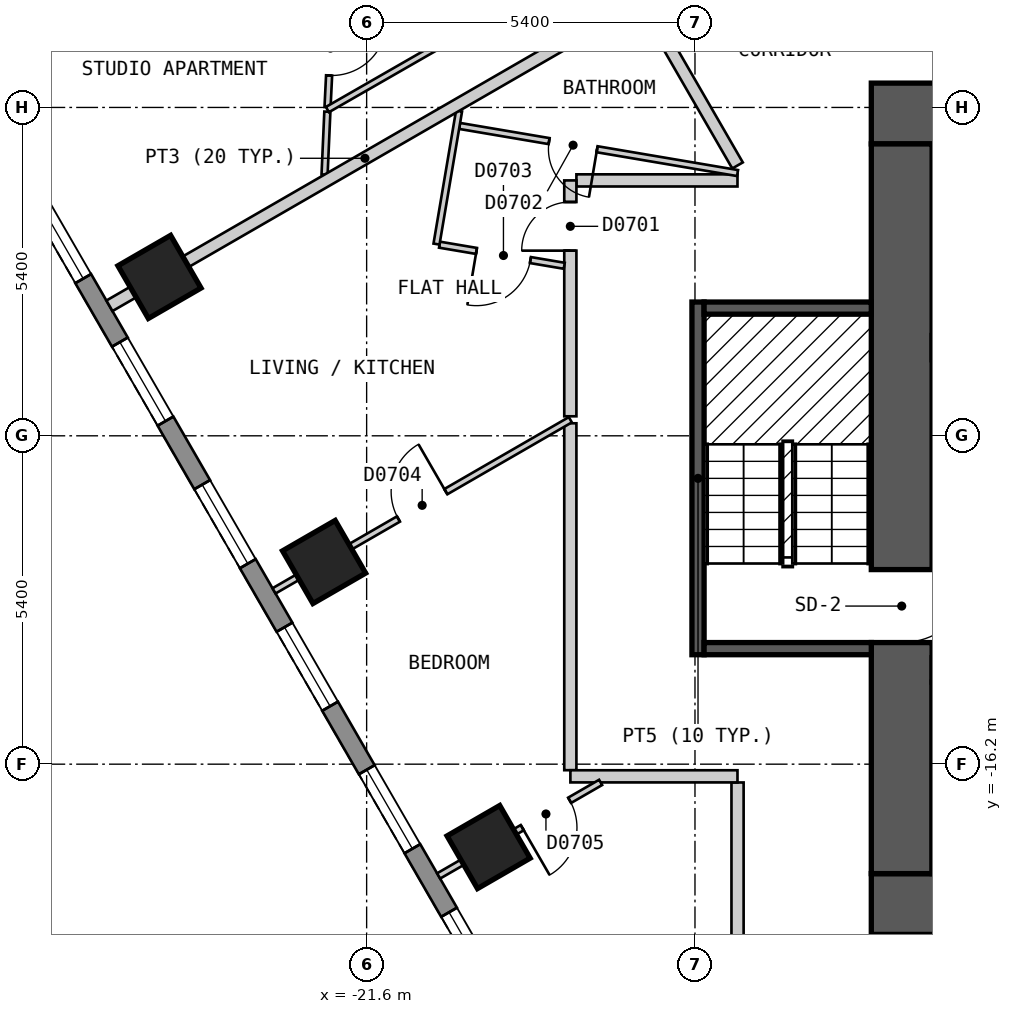
"""IFC4 building model, lengths in metres.
Left out: names, types, materials, properties, quantities, classifications, styles, units other than length and angle.
Written with IfcOpenShell. Run it as: python <this file> out.ifc"""

import sys

from ifc_helpers import new_model, si_unit, direction, frame, frame_2d, origin, origin_2d, place, context, subcontext, project, spatial, polyline, rectangle, outline, extrude, element, fill, save


model = new_model("IFC4")
c1 = context("Model", 3, precision=1e-05, world=origin(), true_north=direction((0.0, 1.0)))
c2 = subcontext(c1, "Body", "Model", "MODEL_VIEW")
j1 = project(units=[si_unit("LENGTHUNIT", "METRE"), si_unit("PLANEANGLEUNIT", "RADIAN")], contexts=[c1])
p1 = place(None, origin())
s1 = spatial("IfcSite", under=j1, at=p1, CompositionType="ELEMENT")
p2 = place(p1, origin())
s2 = spatial("IfcBuilding", under=s1, at=p2, CompositionType="ELEMENT")
p3 = place(p2, frame((0.0, 0.0, 99.0)))
s3 = spatial("IfcBuildingStorey", under=s2, at=p3, CompositionType="ELEMENT", Elevation=99.0)
for number, where, z_axis, x_axis in (
    (1, (-25.007, -8.187, 0.0), (0.0, 0.0, 1.0), (0.5, -0.866, 0.0)),
    (2, (-22.3, -12.875, 0.0), (0.0, 0.0, 1.0), (0.5, -0.866, 0.0)),
    (3, (-19.594, -17.563, 0.0), (0.0, 0.0, 1.0), (0.5, -0.866, 0.0)),
):
    element("IfcColumn", number, at=place(p3, frame(where, z_axis=z_axis, x_axis=x_axis)), inside=s3, PredefinedType="COLUMN", context=c2, shape_type="SweptSolid", body=[
        extrude(rectangle(XDim=1.0, YDim=1.0, at=origin_2d()), origin(), (0.0, 0.0, 1.0), 3.0),
    ])
p4 = place(p3, frame((-13.3, -18.5, 0.0), z_axis=(0.0, 0.0, 1.0), x_axis=(1.0, 0.0, 0.0)))
e4 = element("IfcWall", 4, at=p4, inside=s3, PredefinedType="SHEAR", context=c2, shape_type="SweptSolid", body=[
    extrude(rectangle(XDim=26.6, YDim=1.0, at=frame_2d((13.3, 0.0))), origin(), (0.0, 0.0, 1.0), 2.7),
])
p5 = place(p3, frame((-13.3, -5.5, 0.0), z_axis=(0.0, 0.0, 1.0), x_axis=(1.0, 0.0, 0.0)))
e5 = element("IfcWall", 5, at=p5, inside=s3, PredefinedType="SHEAR", context=c2, shape_type="SweptSolid", body=[
    extrude(rectangle(XDim=26.6, YDim=1.0, at=frame_2d((13.3, 0.0))), origin(), (0.0, 0.0, 1.0), 2.7),
])
p6 = place(p5, frame((23.65, 0.0, 0.0)))
e6 = element("IfcOpeningElement", 6, at=p6, cuts=e5, PredefinedType="OPENING", context=c2, shape_type="SweptSolid", body=[
    extrude(rectangle(XDim=1.2, YDim=2.1, at=frame_2d((0.6, 1.05))), frame((0.0, 0.51, 0.0), z_axis=(0.0, -1.0, 0.0), x_axis=(1.0, 0.0, 0.0)), (0.0, 0.0, 1.0), 1.02),
])
p7 = place(p3, frame((-12.8, -18.0, 0.0), z_axis=(0.0, 0.0, 1.0), x_axis=(0.0, 1.0, 0.0)))
e7 = element("IfcWall", 7, at=p7, inside=s3, PredefinedType="SHEAR", context=c2, shape_type="SweptSolid", body=[
    extrude(rectangle(XDim=12.0, YDim=1.0, at=frame_2d((6.0, 0.0))), origin(), (0.0, 0.0, 1.0), 2.7),
])
p8 = place(p7, frame((3.8, 0.0, 0.0)))
e8 = element("IfcOpeningElement", 8, at=p8, cuts=e7, PredefinedType="OPENING", context=c2, shape_type="SweptSolid", body=[
    extrude(rectangle(XDim=1.2, YDim=2.1, at=frame_2d((0.6, 1.05))), frame((0.0, 0.51, 0.0), z_axis=(0.0, -1.0, 0.0), x_axis=(1.0, 0.0, 0.0)), (0.0, 0.0, 1.0), 1.02),
])
p9 = place(p3, frame((-29.027, -3.425, 0.0), z_axis=(0.0, 0.0, 1.0), x_axis=(0.500035407905, -0.866004960056, 0.0)))
e9 = element("IfcWall", 9, at=p9, inside=s3, PredefinedType="SOLIDWALL", context=c2, shape_type="SweptSolid", body=[
    extrude(outline(polyline([(0.0, -0.15), (23.094, -0.15), (23.014, 0.15), (0.08, 0.15), (0.0, -0.15)])), origin(), (0.0, 0.0, 1.0), 2.7),
])
p10 = place(p9, frame((1.324, 0.0, 0.15)))
e10 = element("IfcOpeningElement", 10, at=p10, cuts=e9, PredefinedType="OPENING", context=c2, shape_type="SweptSolid", body=[
    extrude(rectangle(XDim=1.5, YDim=2.1, at=frame_2d((0.75, 1.05))), frame((0.0, 0.16, 0.0), z_axis=(0.0, -1.0, 0.0), x_axis=(1.0, 0.0, 0.0)), (0.0, 0.0, 1.0), 0.32),
])
p11 = place(p9, frame((4.031, 0.0, 0.15)))
e11 = element("IfcOpeningElement", 11, at=p11, cuts=e9, PredefinedType="OPENING", context=c2, shape_type="SweptSolid", body=[
    extrude(rectangle(XDim=1.5, YDim=2.1, at=frame_2d((0.75, 1.05))), frame((0.0, 0.16, 0.0), z_axis=(0.0, -1.0, 0.0), x_axis=(1.0, 0.0, 0.0)), (0.0, 0.0, 1.0), 0.32),
])
p12 = place(p9, frame((6.737, 0.0, 0.15)))
e12 = element("IfcOpeningElement", 12, at=p12, cuts=e9, PredefinedType="OPENING", context=c2, shape_type="SweptSolid", body=[
    extrude(rectangle(XDim=1.5, YDim=2.1, at=frame_2d((0.75, 1.05))), frame((0.0, 0.16, 0.0), z_axis=(0.0, -1.0, 0.0), x_axis=(1.0, 0.0, 0.0)), (0.0, 0.0, 1.0), 0.32),
])
p13 = place(p9, frame((9.444, 0.0, 0.15)))
e13 = element("IfcOpeningElement", 13, at=p13, cuts=e9, PredefinedType="OPENING", context=c2, shape_type="SweptSolid", body=[
    extrude(rectangle(XDim=1.5, YDim=2.1, at=frame_2d((0.75, 1.05))), frame((0.0, 0.16, 0.0), z_axis=(0.0, -1.0, 0.0), x_axis=(1.0, 0.0, 0.0)), (0.0, 0.0, 1.0), 0.32),
])
p14 = place(p9, frame((12.151, 0.0, 0.15)))
e14 = element("IfcOpeningElement", 14, at=p14, cuts=e9, PredefinedType="OPENING", context=c2, shape_type="SweptSolid", body=[
    extrude(rectangle(XDim=1.5, YDim=2.1, at=frame_2d((0.75, 1.05))), frame((0.0, 0.16, 0.0), z_axis=(0.0, -1.0, 0.0), x_axis=(1.0, 0.0, 0.0)), (0.0, 0.0, 1.0), 0.32),
])
p15 = place(p9, frame((14.857, 0.0, 0.15)))
e15 = element("IfcOpeningElement", 15, at=p15, cuts=e9, PredefinedType="OPENING", context=c2, shape_type="SweptSolid", body=[
    extrude(rectangle(XDim=1.5, YDim=2.1, at=frame_2d((0.75, 1.05))), frame((0.0, 0.16, 0.0), z_axis=(0.0, -1.0, 0.0), x_axis=(1.0, 0.0, 0.0)), (0.0, 0.0, 1.0), 0.32),
])
p16 = place(p9, frame((17.564, 0.0, 0.15)))
e16 = element("IfcOpeningElement", 16, at=p16, cuts=e9, PredefinedType="OPENING", context=c2, shape_type="SweptSolid", body=[
    extrude(rectangle(XDim=1.5, YDim=2.1, at=frame_2d((0.75, 1.05))), frame((0.0, 0.16, 0.0), z_axis=(0.0, -1.0, 0.0), x_axis=(1.0, 0.0, 0.0)), (0.0, 0.0, 1.0), 0.32),
])
p17 = place(p9, frame((20.27, 0.0, 0.15)))
e17 = element("IfcOpeningElement", 17, at=p17, cuts=e9, PredefinedType="OPENING", context=c2, shape_type="SweptSolid", body=[
    extrude(rectangle(XDim=1.5, YDim=2.1, at=frame_2d((0.75, 1.05))), frame((0.0, 0.16, 0.0), z_axis=(0.0, -1.0, 0.0), x_axis=(1.0, 0.0, 0.0)), (0.0, 0.0, 1.0), 0.32),
])
p18 = place(p3, frame((-16.855, -4.008, 0.0), z_axis=(0.0, 0.0, 1.0), x_axis=(0.500151474942, -0.865937932021, 0.0)))
e18 = element("IfcWall", 18, at=p18, inside=s3, PredefinedType="PARTITIONING", context=c2, shape_type="SweptSolid", body=[
    extrude(rectangle(XDim=2.709, YDim=0.2, at=frame_2d((1.354, 0.0))), origin(), (0.0, 0.0, 1.0), 2.7),
])
p19 = place(p3, frame((-15.5, -16.501, 0.0), z_axis=(0.0, 0.0, 1.0), x_axis=(0.0, -1.0, 0.0)))
e19 = element("IfcWall", 19, at=p19, inside=s3, PredefinedType="PARTITIONING", context=c2, shape_type="SweptSolid", body=[
    extrude(rectangle(XDim=4.598, YDim=0.2, at=frame_2d((2.299, 0.0))), origin(), (0.0, 0.0, 1.0), 2.7),
])
p20 = place(p3, frame((-18.25, -10.594, 0.0), z_axis=(0.0, 0.0, 1.0), x_axis=(0.0, -1.0, 0.0)))
e20 = element("IfcWall", 20, at=p20, inside=s3, PredefinedType="PARTITIONING", context=c2, shape_type="SweptSolid", body=[
    extrude(rectangle(XDim=5.705, YDim=0.2, at=frame_2d((2.853, 0.0))), origin(), (0.0, 0.0, 1.0), 2.7),
])
p21 = place(p3, frame((-18.15, -6.6, 0.0), z_axis=(0.0, 0.0, 1.0), x_axis=(1.0, 0.0, 0.0)))
e21 = element("IfcWall", 21, at=p21, inside=s3, PredefinedType="PARTITIONING", context=c2, shape_type="SweptSolid", body=[
    extrude(rectangle(XDim=2.649, YDim=0.2, at=frame_2d((1.324, 0.0))), origin(), (0.0, 0.0, 1.0), 2.7),
])
p22 = place(p3, frame((-18.249, -16.4, 0.0), z_axis=(0.0, 0.0, 1.0), x_axis=(1.0, 0.0, 0.0)))
e22 = element("IfcWall", 22, at=p22, inside=s3, PredefinedType="PARTITIONING", context=c2, shape_type="SweptSolid", body=[
    extrude(rectangle(XDim=2.748, YDim=0.2, at=frame_2d((1.374, 0.0))), origin(), (0.0, 0.0, 1.0), 2.7),
])
p23 = place(p3, frame((-18.25, -10.479, 0.0), z_axis=(0.0, 0.0, 1.0), x_axis=(0.0, 1.0, 0.0)))
e23 = element("IfcWall", 23, at=p23, inside=s3, PredefinedType="PARTITIONING", context=c2, shape_type="SweptSolid", body=[
    extrude(rectangle(XDim=3.879, YDim=0.2, at=frame_2d((1.939, 0.0))), origin(), (0.0, 0.0, 1.0), 2.7),
])
p24 = place(p23, frame((2.724, 0.0, 0.0)))
e24 = element("IfcOpeningElement", 24, at=p24, cuts=e23, PredefinedType="OPENING", context=c2, shape_type="SweptSolid", body=[
    extrude(rectangle(XDim=0.8, YDim=2.1, at=frame_2d((0.4, 1.05))), frame((0.0, 0.11, 0.0), z_axis=(0.0, -1.0, 0.0), x_axis=(1.0, 0.0, 0.0)), (0.0, 0.0, 1.0), 0.22),
])
p25 = place(p3, frame((-20.071, -5.704, 0.0), z_axis=(0.0, 0.0, 1.0), x_axis=(0.985933263306, -0.16713946364, 0.0)))
e25 = element("IfcWall", 25, at=p25, inside=s3, PredefinedType="PARTITIONING", context=c2, shape_type="SweptSolid", body=[
    extrude(rectangle(XDim=4.636, YDim=0.1, at=frame_2d((2.318, 0.0))), origin(), (0.0, 0.0, 1.0), 2.7),
])
p26 = place(p25, frame((1.493, 0.0, 0.0)))
e26 = element("IfcOpeningElement", 26, at=p26, cuts=e25, PredefinedType="OPENING", context=c2, shape_type="SweptSolid", body=[
    extrude(rectangle(XDim=0.8, YDim=2.1, at=frame_2d((0.4, 1.05))), frame((0.0, 0.06, 0.0), z_axis=(0.0, -1.0, 0.0), x_axis=(1.0, 0.0, 0.0)), (0.0, 0.0, 1.0), 0.12),
])
p27 = place(p3, frame((-20.401, -7.657, 0.0), z_axis=(0.0, 0.0, 1.0), x_axis=(0.985991281902, -0.166796858522, 0.0)))
e27 = element("IfcWall", 27, at=p27, inside=s3, PredefinedType="PARTITIONING", context=c2, shape_type="SweptSolid", body=[
    extrude(rectangle(XDim=2.08, YDim=0.1, at=frame_2d((1.04, 0.0))), origin(), (0.0, 0.0, 1.0), 2.7),
])
p28 = place(p27, frame((0.616, 0.0, 0.0)))
e28 = element("IfcOpeningElement", 28, at=p28, cuts=e27, PredefinedType="OPENING", context=c2, shape_type="SweptSolid", body=[
    extrude(rectangle(XDim=0.9, YDim=2.1, at=frame_2d((0.45, 1.05))), frame((0.0, 0.06, 0.0), z_axis=(0.0, -1.0, 0.0), x_axis=(1.0, 0.0, 0.0)), (0.0, 0.0, 1.0), 0.12),
])
p29 = place(p3, frame((-20.451, -7.647, 0.0), z_axis=(0.0, 0.0, 1.0), x_axis=(0.167037570483, 0.985950531237, 0.0)))
e29 = element("IfcWall", 29, at=p29, inside=s3, PredefinedType="PARTITIONING", context=c2, shape_type="SweptSolid", body=[
    extrude(rectangle(XDim=2.22, YDim=0.1, at=frame_2d((1.11, 0.0))), origin(), (0.0, 0.0, 1.0), 2.7),
])
p30 = place(p3, frame((-22.243, -5.395, 0.0), z_axis=(0.0, 0.0, 1.0), x_axis=(0.049092933256, 0.998794214993, 0.0)))
e30 = element("IfcWall", 30, at=p30, inside=s3, PredefinedType="PARTITIONING", context=c2, shape_type="SweptSolid", body=[
    extrude(rectangle(XDim=2.422, YDim=0.1, at=frame_2d((1.211, 0.0))), origin(), (0.0, 0.0, 1.0), 2.7),
])
p31 = place(p30, frame((0.522, 0.0, 0.0)))
e31 = element("IfcOpeningElement", 31, at=p31, cuts=e30, PredefinedType="OPENING", context=c2, shape_type="SweptSolid", body=[
    extrude(rectangle(XDim=0.9, YDim=2.1, at=frame_2d((0.45, 1.05))), frame((0.0, 0.06, 0.0), z_axis=(0.0, -1.0, 0.0), x_axis=(1.0, 0.0, 0.0)), (0.0, 0.0, 1.0), 0.12),
])
p32 = place(p3, frame((-22.292, -6.504, 0.0), z_axis=(0.0, 0.0, 1.0), x_axis=(0.04434829575, 0.999016130332, 0.0)))
e32 = element("IfcWall", 32, at=p32, inside=s3, PredefinedType="PARTITIONING", context=c2, shape_type="SweptSolid", body=[
    extrude(rectangle(XDim=1.035, YDim=0.1, at=frame_2d((0.518, 0.0))), origin(), (0.0, 0.0, 1.0), 2.7),
])
p33 = place(p3, frame((-20.416, -18.038, 0.0), z_axis=(0.0, 0.0, 1.0), x_axis=(0.866026989333, 0.499997253739, 0.0)))
e33 = element("IfcWall", 33, at=p33, inside=s3, PredefinedType="PARTITIONING", context=c2, shape_type="SweptSolid", body=[
    extrude(rectangle(XDim=3.076, YDim=0.1, at=frame_2d((1.538, 0.0))), origin(), (0.0, 0.0, 1.0), 2.7),
])
p34 = place(p33, frame((1.588, 0.0, 0.0)))
e34 = element("IfcOpeningElement", 34, at=p34, cuts=e33, PredefinedType="OPENING", context=c2, shape_type="SweptSolid", body=[
    extrude(rectangle(XDim=0.9, YDim=2.1, at=frame_2d((0.45, 1.05))), frame((0.0, 0.06, 0.0), z_axis=(0.0, -1.0, 0.0), x_axis=(1.0, 0.0, 0.0)), (0.0, 0.0, 1.0), 0.12),
])
p35 = place(p3, frame((-23.123, -13.35, 0.0), z_axis=(0.0, 0.0, 1.0), x_axis=(0.86596737403, 0.500100497016, 0.0)))
e35 = element("IfcWall", 35, at=p35, inside=s3, PredefinedType="PARTITIONING", context=c2, shape_type="SweptSolid", body=[
    extrude(rectangle(XDim=5.627, YDim=0.1, at=frame_2d((2.813, 0.0))), origin(), (0.0, 0.0, 1.0), 2.7),
])
p36 = place(p35, frame((2.363, 0.0, 0.0)))
e36 = element("IfcOpeningElement", 36, at=p36, cuts=e35, PredefinedType="OPENING", context=c2, shape_type="SweptSolid", body=[
    extrude(rectangle(XDim=0.9, YDim=2.1, at=frame_2d((0.45, 1.05))), frame((0.0, 0.06, 0.0), z_axis=(0.0, -1.0, 0.0), x_axis=(1.0, 0.0, 0.0)), (0.0, 0.0, 1.0), 0.12),
])
p37 = place(p3, frame((-22.245, -5.435, 0.0), z_axis=(0.0, 0.0, 1.0), x_axis=(0.867311485465, 0.497765795511, 0.0)))
e37 = element("IfcWall", 37, at=p37, inside=s3, PredefinedType="PARTITIONING", context=c2, shape_type="SweptSolid", body=[
    extrude(rectangle(XDim=5.282, YDim=0.1, at=frame_2d((2.641, 0.0))), origin(), (0.0, 0.0, 1.0), 2.7),
])
p38 = place(p37, frame((2.291, 0.0, 0.0)))
e38 = element("IfcOpeningElement", 38, at=p38, cuts=e37, PredefinedType="OPENING", context=c2, shape_type="SweptSolid", body=[
    extrude(rectangle(XDim=0.8, YDim=2.1, at=frame_2d((0.4, 1.05))), frame((0.0, 0.06, 0.0), z_axis=(0.0, -1.0, 0.0), x_axis=(1.0, 0.0, 0.0)), (0.0, 0.0, 1.0), 0.12),
])
p39 = place(p3, frame((-25.83, -8.662, 0.0), z_axis=(0.0, 0.0, 1.0), x_axis=(0.866026801646, 0.499997578825, 0.0)))
e39 = element("IfcWall", 39, at=p39, inside=s3, PredefinedType="PARTITIONING", context=c2, shape_type="SweptSolid", body=[
    extrude(rectangle(XDim=9.704, YDim=0.2, at=frame_2d((4.852, 0.0))), origin(), (0.0, 0.0, 1.0), 2.7),
])
p40 = place(p3, frame((-16.15, -14.4, 0.0), z_axis=(0.0, 0.0, 1.0), x_axis=(0.0, 1.0, 0.0)))
e40 = element("IfcWall", 40, at=p40, inside=s3, PredefinedType="SOLIDWALL", context=c2, shape_type="SweptSolid", body=[
    extrude(rectangle(XDim=5.8, YDim=0.2, at=frame_2d((2.9, 0.0))), origin(), (0.0, 0.0, 1.0), 2.7),
])
for number, where, z_axis, x_axis in (
    (41, (-16.05, -14.3, 0.0), (0.0, 0.0, 1.0), (1.0, 0.0, 0.0)),
    (42, (-16.05, -8.7, 0.0), (0.0, 0.0, 1.0), (1.0, 0.0, 0.0)),
):
    element("IfcWall", number, at=place(p3, frame(where, z_axis=z_axis, x_axis=x_axis)), inside=s3, PredefinedType="SOLIDWALL", context=c2, shape_type="SweptSolid", body=[
        extrude(rectangle(XDim=2.75, YDim=0.2, at=frame_2d((1.375, 0.0))), origin(), (0.0, 0.0, 1.0), 2.7),
    ])
p41 = place(p11, origin())
e43 = element("IfcWindow", 43, at=p41, inside=s3, PartitioningType="SINGLE_PANEL", PredefinedType="WINDOW", context=c2, shape_type="SweptSolid", body=[
    extrude(rectangle(XDim=1.5, YDim=2.1, at=frame_2d((0.75, 1.05))), frame((0.0, 0.03, 0.0), z_axis=(0.0, -1.0, 0.0), x_axis=(1.0, 0.0, 0.0)), (0.0, 0.0, 1.0), 0.06),
])
fill(e11, e43)
p42 = place(p12, origin())
e44 = element("IfcWindow", 44, at=p42, inside=s3, PartitioningType="SINGLE_PANEL", PredefinedType="WINDOW", context=c2, shape_type="SweptSolid", body=[
    extrude(rectangle(XDim=1.5, YDim=2.1, at=frame_2d((0.75, 1.05))), frame((0.0, 0.03, 0.0), z_axis=(0.0, -1.0, 0.0), x_axis=(1.0, 0.0, 0.0)), (0.0, 0.0, 1.0), 0.06),
])
fill(e12, e44)
p43 = place(p13, origin())
e45 = element("IfcWindow", 45, at=p43, inside=s3, PartitioningType="SINGLE_PANEL", PredefinedType="WINDOW", context=c2, shape_type="SweptSolid", body=[
    extrude(rectangle(XDim=1.5, YDim=2.1, at=frame_2d((0.75, 1.05))), frame((0.0, 0.03, 0.0), z_axis=(0.0, -1.0, 0.0), x_axis=(1.0, 0.0, 0.0)), (0.0, 0.0, 1.0), 0.06),
])
fill(e13, e45)
p44 = place(p14, origin())
e46 = element("IfcWindow", 46, at=p44, inside=s3, PartitioningType="SINGLE_PANEL", PredefinedType="WINDOW", context=c2, shape_type="SweptSolid", body=[
    extrude(rectangle(XDim=1.5, YDim=2.1, at=frame_2d((0.75, 1.05))), frame((0.0, 0.03, 0.0), z_axis=(0.0, -1.0, 0.0), x_axis=(1.0, 0.0, 0.0)), (0.0, 0.0, 1.0), 0.06),
])
fill(e14, e46)
p45 = place(p15, origin())
e47 = element("IfcWindow", 47, at=p45, inside=s3, PartitioningType="SINGLE_PANEL", PredefinedType="WINDOW", context=c2, shape_type="SweptSolid", body=[
    extrude(rectangle(XDim=1.5, YDim=2.1, at=frame_2d((0.75, 1.05))), frame((0.0, 0.03, 0.0), z_axis=(0.0, -1.0, 0.0), x_axis=(1.0, 0.0, 0.0)), (0.0, 0.0, 1.0), 0.06),
])
fill(e15, e47)
p46 = place(p16, origin())
e48 = element("IfcWindow", 48, at=p46, inside=s3, PartitioningType="SINGLE_PANEL", PredefinedType="WINDOW", context=c2, shape_type="SweptSolid", body=[
    extrude(rectangle(XDim=1.5, YDim=2.1, at=frame_2d((0.75, 1.05))), frame((0.0, 0.03, 0.0), z_axis=(0.0, -1.0, 0.0), x_axis=(1.0, 0.0, 0.0)), (0.0, 0.0, 1.0), 0.06),
])
fill(e16, e48)
p47 = place(p24, origin())
e49 = element("IfcDoor", 49, at=p47, inside=s3, OperationType="SINGLE_SWING_LEFT", PredefinedType="DOOR", context=c2, shape_type="SweptSolid", body=[
    extrude(rectangle(XDim=0.8, YDim=2.1, at=frame_2d((0.4, 1.05))), frame((0.0, 0.025, 0.0), z_axis=(0.0, -1.0, 0.0), x_axis=(1.0, 0.0, 0.0)), (0.0, 0.0, 1.0), 0.05),
])
fill(e24, e49)
p48 = place(p26, origin())
e50 = element("IfcDoor", 50, at=p48, inside=s3, OperationType="SINGLE_SWING_RIGHT", PredefinedType="DOOR", context=c2, shape_type="SweptSolid", body=[
    extrude(rectangle(XDim=0.8, YDim=2.1, at=frame_2d((0.4, 1.05))), frame((0.0, 0.025, 0.0), z_axis=(0.0, -1.0, 0.0), x_axis=(1.0, 0.0, 0.0)), (0.0, 0.0, 1.0), 0.05),
])
fill(e26, e50)
p49 = place(p28, origin())
e51 = element("IfcDoor", 51, at=p49, inside=s3, OperationType="SINGLE_SWING_LEFT", PredefinedType="DOOR", context=c2, shape_type="SweptSolid", body=[
    extrude(rectangle(XDim=0.9, YDim=2.1, at=frame_2d((0.45, 1.05))), frame((0.0, 0.025, 0.0), z_axis=(0.0, -1.0, 0.0), x_axis=(1.0, 0.0, 0.0)), (0.0, 0.0, 1.0), 0.05),
])
fill(e28, e51)
p50 = place(p36, origin())
e52 = element("IfcDoor", 52, at=p50, inside=s3, OperationType="SINGLE_SWING_RIGHT", PredefinedType="DOOR", context=c2, shape_type="SweptSolid", body=[
    extrude(rectangle(XDim=0.9, YDim=2.1, at=frame_2d((0.45, 1.05))), frame((0.0, 0.025, 0.0), z_axis=(0.0, -1.0, 0.0), x_axis=(1.0, 0.0, 0.0)), (0.0, 0.0, 1.0), 0.05),
])
fill(e36, e52)
p51 = place(p34, origin())
e53 = element("IfcDoor", 53, at=p51, inside=s3, OperationType="SINGLE_SWING_LEFT", PredefinedType="DOOR", context=c2, shape_type="SweptSolid", body=[
    extrude(rectangle(XDim=0.9, YDim=2.1, at=frame_2d((0.45, 1.05))), frame((0.0, 0.025, 0.0), z_axis=(0.0, -1.0, 0.0), x_axis=(1.0, 0.0, 0.0)), (0.0, 0.0, 1.0), 0.05),
])
fill(e34, e53)
p52 = place(p31, origin())
e54 = element("IfcDoor", 54, at=p52, inside=s3, OperationType="SINGLE_SWING_RIGHT", PredefinedType="DOOR", context=c2, shape_type="SweptSolid", body=[
    extrude(rectangle(XDim=0.9, YDim=2.1, at=frame_2d((0.45, 1.05))), frame((0.0, 0.025, 0.0), z_axis=(0.0, -1.0, 0.0), x_axis=(1.0, 0.0, 0.0)), (0.0, 0.0, 1.0), 0.05),
])
fill(e31, e54)
p53 = place(p8, origin())
e55 = element("IfcDoor", 55, at=p53, inside=s3, OperationType="SINGLE_SWING_RIGHT", PredefinedType="DOOR", context=c2, shape_type="SweptSolid", body=[
    extrude(rectangle(XDim=1.2, YDim=2.1, at=frame_2d((0.6, 1.05))), frame((0.0, 0.025, 0.0), z_axis=(0.0, -1.0, 0.0), x_axis=(1.0, 0.0, 0.0)), (0.0, 0.0, 1.0), 0.05),
])
fill(e8, e55)
save(model, sys.argv[1])
